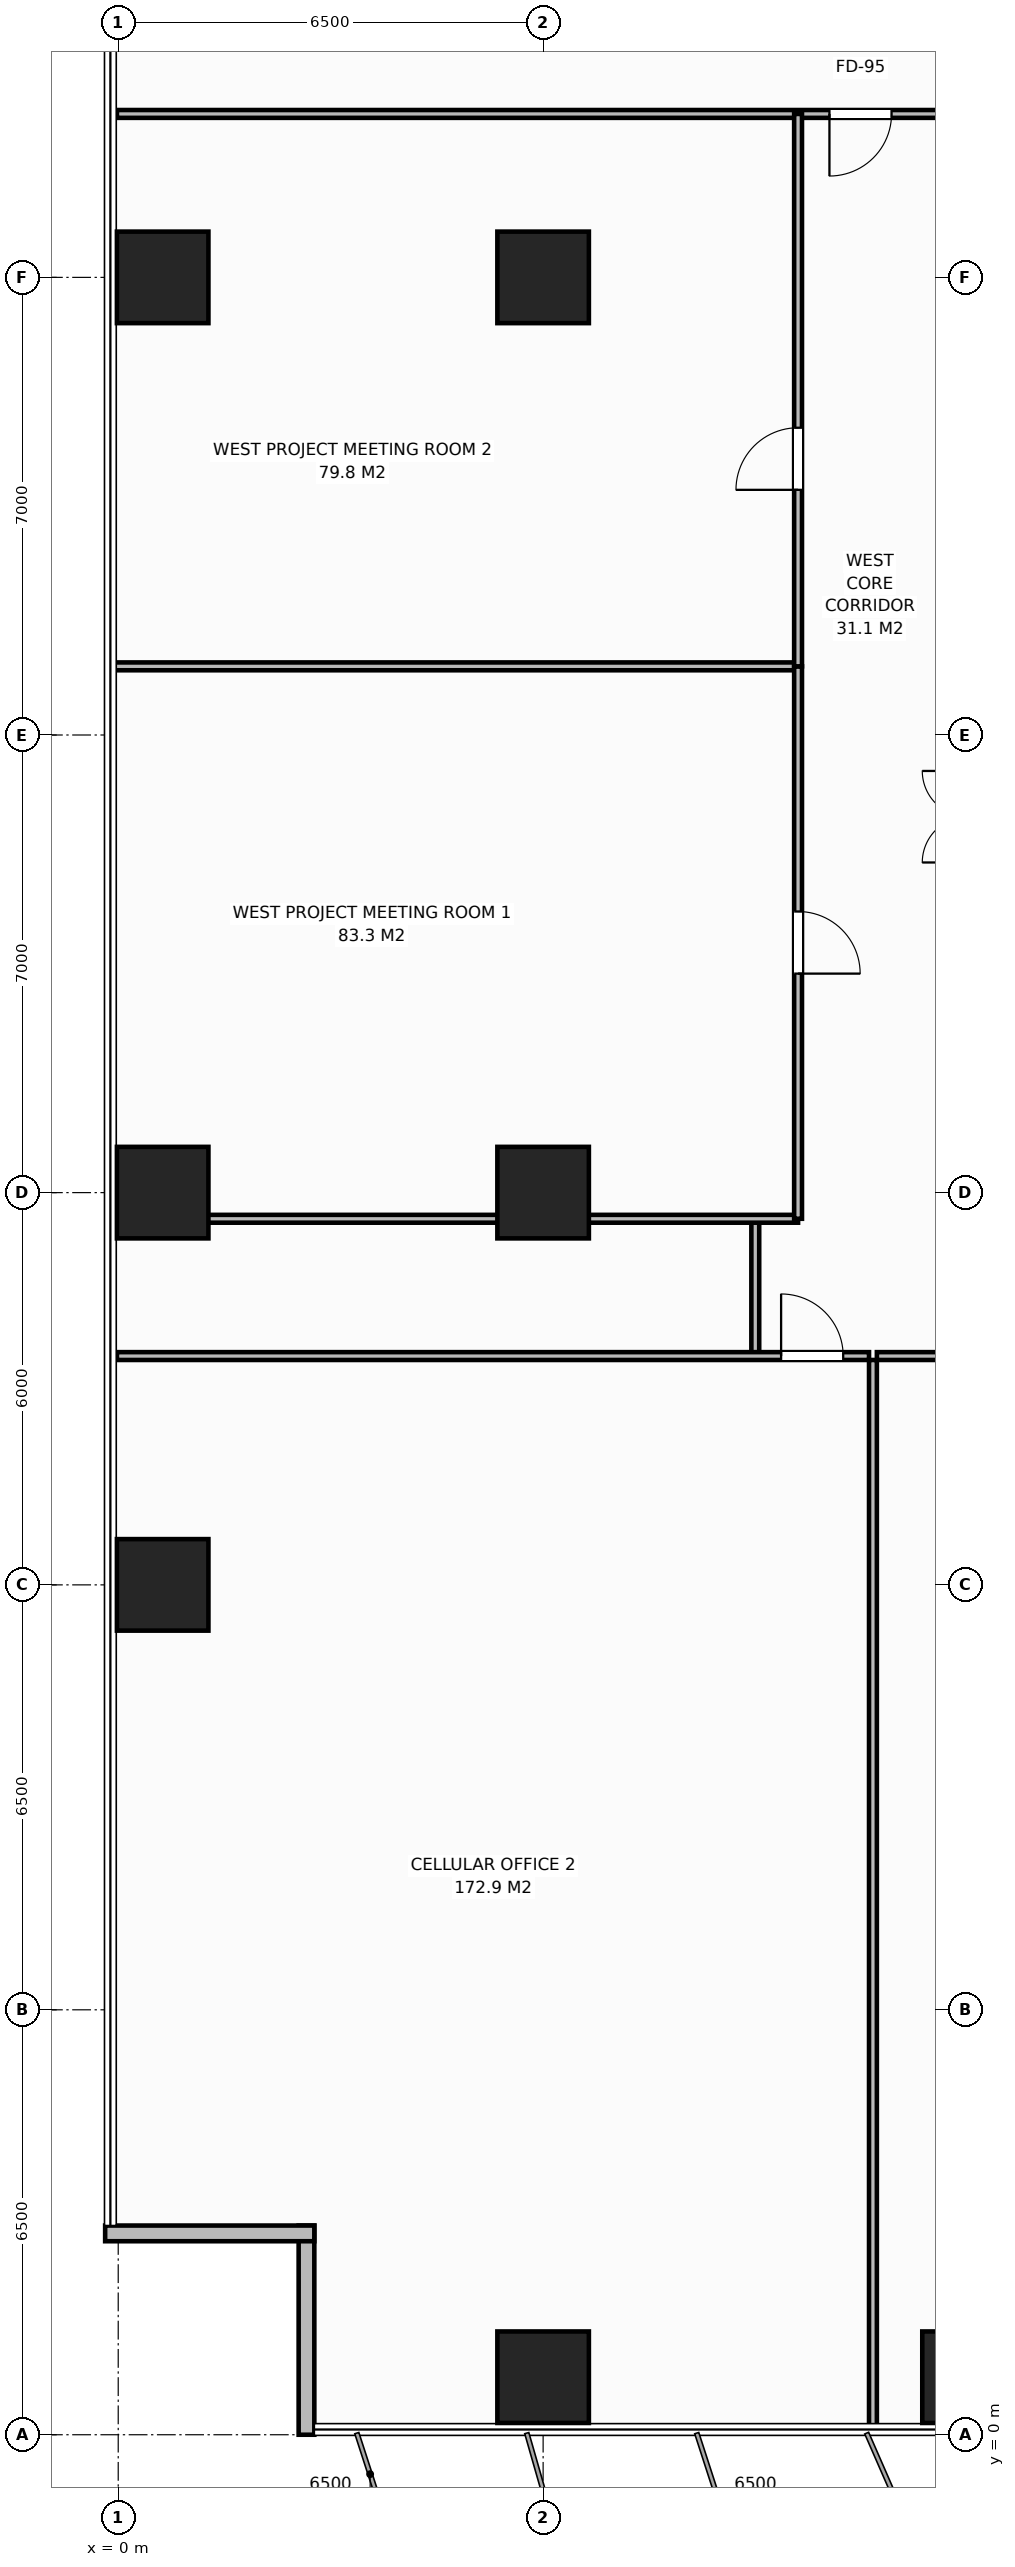
"""IFC4 building model, lengths in metres.
Left out: names, types, materials, properties, quantities, classifications, styles, units other than length and angle.
Written with IfcOpenShell. Run it as: python <this file> out.ifc"""

import sys

from ifc_helpers import new_model, si_unit, direction, frame, frame_2d, origin, origin_2d, place, context, subcontext, project, spatial, rectangle, extrude, element, fill, save


model = new_model("IFC4")
c1 = context("Model", 3, precision=1e-05, world=origin(), true_north=direction((0.0, 1.0)))
c2 = subcontext(c1, "Body", "Model", "MODEL_VIEW")
j1 = project(units=[si_unit("LENGTHUNIT", "METRE"), si_unit("PLANEANGLEUNIT", "RADIAN")], contexts=[c1])
p1 = place(None, origin())
s1 = spatial("IfcSite", under=j1, at=p1, CompositionType="ELEMENT")
p2 = place(p1, origin())
s2 = spatial("IfcBuilding", under=s1, at=p2, CompositionType="ELEMENT")
p3 = place(p2, frame((0.0, 0.0, 73.4)))
s3 = spatial("IfcBuildingStorey", under=s2, at=p3, CompositionType="ELEMENT", Elevation=73.4)
for number, where, z_axis, x_axis in (
    (1, (6.5, 19.0, 0.0), (0.0, 0.0, 1.0), (1.0, 0.0, 0.0)),
    (2, (6.5, 33.0, 0.0), (0.0, 0.0, 1.0), (1.0, 0.0, 0.0)),
    (3, (6.5, 0.88, 0.0), (0.0, 0.0, 1.0), (1.0, 0.0, 0.0)),
    (4, (13.0, 0.88, 0.0), (0.0, 0.0, 1.0), (1.0, 0.0, 0.0)),
    (5, (0.68, 13.0, 0.0), (0.0, 0.0, 1.0), (1.0, 0.0, 0.0)),
    (6, (0.68, 19.0, 0.0), (0.0, 0.0, 1.0), (1.0, 0.0, 0.0)),
    (7, (0.68, 33.0, 0.0), (0.0, 0.0, 1.0), (1.0, 0.0, 0.0)),
):
    element("IfcColumn", number, at=place(p3, frame(where, z_axis=z_axis, x_axis=x_axis)), inside=s3, PredefinedType="COLUMN", context=c2, shape_type="SweptSolid", body=[
        extrude(rectangle(XDim=1.4, YDim=1.4, at=origin_2d()), origin(), (0.0, 0.0, 1.0), 3.8),
    ])
for number, where, z_axis, x_axis in (
    (8, (2.88, 0.0, 0.0), (0.0, 0.0, 1.0), (0.0, 1.0, 0.0)),
    (9, (3.0, 3.08, 0.0), (0.0, 0.0, 1.0), (-1.0, 0.0, 0.0)),
):
    element("IfcWall", number, at=place(p3, frame(where, z_axis=z_axis, x_axis=x_axis)), inside=s3, PredefinedType="STANDARD", context=c2, shape_type="SweptSolid", body=[
        extrude(rectangle(XDim=3.2, YDim=0.24, at=frame_2d((1.6, 0.0))), origin(), (0.0, 0.0, 1.0), 3.55),
    ])
p4 = place(p3, frame((9.746, 16.5, 0.0), z_axis=(0.0, 0.0, 1.0), x_axis=(0.0, 1.0, 0.0)))
e10 = element("IfcWall", 10, at=p4, inside=s3, PredefinedType="PARTITIONING", context=c2, shape_type="SweptSolid", body=[
    extrude(rectangle(XDim=2.1, YDim=0.12, at=frame_2d((1.05, 0.0))), origin(), (0.0, 0.0, 1.0), 3.55),
])
p5 = place(p3, frame((-0.02, 35.5, 0.0), z_axis=(0.0, 0.0, 1.0), x_axis=(1.0, 0.0, 0.0)))
e11 = element("IfcWall", 11, at=p5, inside=s3, PredefinedType="PARTITIONING", context=c2, shape_type="SweptSolid", body=[
    extrude(rectangle(XDim=13.16, YDim=0.12, at=frame_2d((6.58, 0.0))), origin(), (0.0, 0.0, 1.0), 3.55),
])
p6 = place(p5, frame((10.9, 0.0, 0.0)))
e12 = element("IfcOpeningElement", 12, at=p6, cuts=e11, PredefinedType="OPENING", context=c2, shape_type="SweptSolid", body=[
    extrude(rectangle(XDim=0.95, YDim=2.15, at=frame_2d((0.475, 1.075))), frame((0.0, 0.07, 0.0), z_axis=(0.0, -1.0, 0.0), x_axis=(1.0, 0.0, 0.0)), (0.0, 0.0, 1.0), 0.14),
])
p7 = place(p3, frame((11.545, 0.02, 0.0), z_axis=(0.0, 0.0, 1.0), x_axis=(0.0, 1.0, 0.0)))
e13 = element("IfcWall", 13, at=p7, inside=s3, PredefinedType="PARTITIONING", context=c2, shape_type="SweptSolid", body=[
    extrude(rectangle(XDim=16.42, YDim=0.12, at=frame_2d((8.21, 0.0))), origin(), (0.0, 0.0, 1.0), 3.55),
])
p8 = place(p3, frame((-0.02, 16.5, 0.0), z_axis=(0.0, 0.0, 1.0), x_axis=(1.0, 0.0, 0.0)))
e14 = element("IfcWall", 14, at=p8, inside=s3, PredefinedType="PARTITIONING", context=c2, shape_type="SweptSolid", body=[
    extrude(rectangle(XDim=11.506, YDim=0.12, at=frame_2d((5.753, 0.0))), origin(), (0.0, 0.0, 1.0), 3.55),
])
p9 = place(p8, frame((10.16, 0.0, 0.0)))
e15 = element("IfcOpeningElement", 15, at=p9, cuts=e14, PredefinedType="OPENING", context=c2, shape_type="SweptSolid", body=[
    extrude(rectangle(XDim=0.95, YDim=2.15, at=frame_2d((0.475, 1.075))), frame((0.0, 0.07, 0.0), z_axis=(0.0, -1.0, 0.0), x_axis=(1.0, 0.0, 0.0)), (0.0, 0.0, 1.0), 0.14),
])
p10 = place(p3, frame((11.605, 16.5, 0.0), z_axis=(0.0, 0.0, 1.0), x_axis=(1.0, 0.0, 0.0)))
e16 = element("IfcWall", 16, at=p10, inside=s3, PredefinedType="PARTITIONING", context=c2, shape_type="SweptSolid", body=[
    extrude(rectangle(XDim=13.67, YDim=0.12, at=frame_2d((6.835, 0.0))), origin(), (0.0, 0.0, 1.0), 3.55),
])
p11 = place(p10, frame((12.24, 0.0, 0.0)))
e17 = element("IfcOpeningElement", 17, at=p11, cuts=e16, PredefinedType="OPENING", context=c2, shape_type="SweptSolid", body=[
    extrude(rectangle(XDim=0.95, YDim=2.15, at=frame_2d((0.475, 1.075))), frame((0.0, 0.07, 0.0), z_axis=(0.0, -1.0, 0.0), x_axis=(1.0, 0.0, 0.0)), (0.0, 0.0, 1.0), 0.14),
])
for number, where, z_axis, x_axis in (
    (18, (-0.18, 18.6, 0.0), (0.0, 0.0, 1.0), (1.0, 0.0, 0.0)),
    (19, (-0.18, 27.05, 0.0), (0.0, 0.0, 1.0), (1.0, 0.0, 0.0)),
):
    element("IfcWall", number, at=place(p3, frame(where, z_axis=z_axis, x_axis=x_axis)), inside=s3, PredefinedType="PARTITIONING", context=c2, shape_type="SweptSolid", body=[
        extrude(rectangle(XDim=10.58, YDim=0.12, at=frame_2d((5.29, 0.0))), origin(), (0.0, 0.0, 1.0), 3.55),
    ])
p12 = place(p3, frame((10.4, 18.6, 0.0), z_axis=(0.0, 0.0, 1.0), x_axis=(0.0, 1.0, 0.0)))
e20 = element("IfcWall", 20, at=p12, inside=s3, PredefinedType="PARTITIONING", context=c2, shape_type="SweptSolid", body=[
    extrude(rectangle(XDim=8.45, YDim=0.12, at=frame_2d((4.225, 0.0))), origin(), (0.0, 0.0, 1.0), 3.55),
])
p13 = place(p12, frame((3.75, 0.0, 0.0)))
e21 = element("IfcOpeningElement", 21, at=p13, cuts=e20, PredefinedType="OPENING", context=c2, shape_type="SweptSolid", body=[
    extrude(rectangle(XDim=0.95, YDim=2.15, at=frame_2d((0.475, 1.075))), frame((0.0, 0.07, 0.0), z_axis=(0.0, -1.0, 0.0), x_axis=(1.0, 0.0, 0.0)), (0.0, 0.0, 1.0), 0.14),
])
p14 = place(p3, frame((10.4, 27.05, 0.0), z_axis=(0.0, 0.0, 1.0), x_axis=(0.0, 1.0, 0.0)))
e22 = element("IfcWall", 22, at=p14, inside=s3, PredefinedType="PARTITIONING", context=c2, shape_type="SweptSolid", body=[
    extrude(rectangle(XDim=8.45, YDim=0.12, at=frame_2d((4.225, 0.0))), origin(), (0.0, 0.0, 1.0), 3.55),
])
p15 = place(p14, frame((2.7, 0.0, 0.0)))
e23 = element("IfcOpeningElement", 23, at=p15, cuts=e22, PredefinedType="OPENING", context=c2, shape_type="SweptSolid", body=[
    extrude(rectangle(XDim=0.95, YDim=2.15, at=frame_2d((0.475, 1.075))), frame((0.0, 0.07, 0.0), z_axis=(0.0, -1.0, 0.0), x_axis=(1.0, 0.0, 0.0)), (0.0, 0.0, 1.0), 0.14),
])
p16 = place(p6, origin())
e24 = element("IfcDoor", 24, at=p16, inside=s3, OperationType="SINGLE_SWING_RIGHT", PredefinedType="DOOR", context=c2, shape_type="SweptSolid", body=[
    extrude(rectangle(XDim=0.95, YDim=2.15, at=frame_2d((0.475, 1.075))), frame((0.0, 0.025, 0.0), z_axis=(0.0, -1.0, 0.0), x_axis=(1.0, 0.0, 0.0)), (0.0, 0.0, 1.0), 0.05),
])
fill(e12, e24)
p17 = place(p9, origin())
e25 = element("IfcDoor", 25, at=p17, inside=s3, OperationType="SINGLE_SWING_LEFT", PredefinedType="DOOR", context=c2, shape_type="SweptSolid", body=[
    extrude(rectangle(XDim=0.95, YDim=2.15, at=frame_2d((0.475, 1.075))), frame((0.0, 0.025, 0.0), z_axis=(0.0, -1.0, 0.0), x_axis=(1.0, 0.0, 0.0)), (0.0, 0.0, 1.0), 0.05),
])
fill(e15, e25)
p18 = place(p13, origin())
e26 = element("IfcDoor", 26, at=p18, inside=s3, OperationType="SINGLE_SWING_RIGHT", PredefinedType="DOOR", context=c2, shape_type="SweptSolid", body=[
    extrude(rectangle(XDim=0.95, YDim=2.15, at=frame_2d((0.475, 1.075))), frame((0.0, 0.025, 0.0), z_axis=(0.0, -1.0, 0.0), x_axis=(1.0, 0.0, 0.0)), (0.0, 0.0, 1.0), 0.05),
])
fill(e21, e26)
p19 = place(p15, origin())
e27 = element("IfcDoor", 27, at=p19, inside=s3, OperationType="SINGLE_SWING_LEFT", PredefinedType="DOOR", context=c2, shape_type="SweptSolid", body=[
    extrude(rectangle(XDim=0.95, YDim=2.15, at=frame_2d((0.475, 1.075))), frame((0.0, 0.025, 0.0), z_axis=(0.0, -1.0, 0.0), x_axis=(1.0, 0.0, 0.0)), (0.0, 0.0, 1.0), 0.05),
])
fill(e23, e27)
save(model, sys.argv[1])
